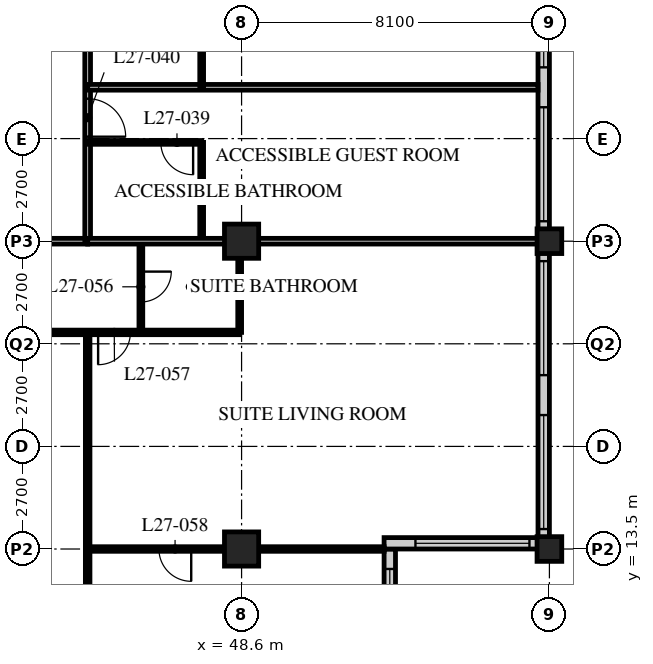
"""IFC4 building model, lengths in metres.
Left out: names, types, materials, properties, quantities, classifications, styles, units other than length and angle.
Written with IfcOpenShell. Run it as: python <this file> out.ifc"""

import sys

from ifc_helpers import new_model, si_unit, direction, frame, frame_2d, origin, origin_2d, place, context, subcontext, project, spatial, rectangle, hollow_rectangle, extrude, element, fill, save


model = new_model("IFC4")
c1 = context("Model", 3, precision=1e-05, world=origin(), true_north=direction((0.0, 1.0)))
c2 = subcontext(c1, "Body", "Model", "MODEL_VIEW")
j1 = project(units=[si_unit("LENGTHUNIT", "METRE"), si_unit("PLANEANGLEUNIT", "RADIAN")], contexts=[c1])
p1 = place(None, origin())
s1 = spatial("IfcSite", under=j1, at=p1, CompositionType="ELEMENT")
p2 = place(p1, origin())
s2 = spatial("IfcBuilding", under=s1, at=p2, CompositionType="ELEMENT")
p3 = place(p2, frame((0.0, 0.0, 110.2)))
s3 = spatial("IfcBuildingStorey", under=s2, at=p3, CompositionType="ELEMENT", Elevation=110.2)
for number, where, z_axis, x_axis in (
    (1, (48.6, 13.5, 0.0), (0.0, 0.0, 1.0), (1.0, 0.0, 0.0)),
    (2, (48.6, 21.6, 0.0), (0.0, 0.0, 1.0), (1.0, 0.0, 0.0)),
):
    element("IfcColumn", number, at=place(p3, frame(where, z_axis=z_axis, x_axis=x_axis)), inside=s3, PredefinedType="COLUMN", context=c2, shape_type="SweptSolid", body=[
        extrude(hollow_rectangle(XDim=0.9, YDim=0.9, WallThickness=0.09, at=origin_2d()), origin(), (0.0, 0.0, 1.0), 3.4),
    ])
for number, where, z_axis, x_axis in (
    (3, (56.7, 13.5, 0.0), (0.0, 0.0, 1.0), (1.0, 0.0, 0.0)),
    (4, (56.7, 21.6, 0.0), (0.0, 0.0, 1.0), (1.0, 0.0, 0.0)),
):
    element("IfcColumn", number, at=place(p3, frame(where, z_axis=z_axis, x_axis=x_axis)), inside=s3, PredefinedType="COLUMN", context=c2, shape_type="SweptSolid", body=[
        extrude(hollow_rectangle(XDim=0.65, YDim=0.65, WallThickness=0.055, at=origin_2d()), origin(), (0.0, 0.0, 1.0), 3.4),
    ])
p4 = place(p3, frame((52.5, 9.75, 0.0), z_axis=(0.0, 0.0, 1.0), x_axis=(0.0, 1.0, 0.0)))
e5 = element("IfcWall", 5, at=p4, inside=s3, PredefinedType="SOLIDWALL", context=c2, shape_type="SweptSolid", body=[
    extrude(rectangle(XDim=3.75, YDim=0.3, at=frame_2d((1.875, 0.0))), origin(), (0.0, 0.0, 1.0), 3.19),
])
p5 = place(p4, frame((0.225, 0.0, 0.9)))
e6 = element("IfcOpeningElement", 6, at=p5, cuts=e5, PredefinedType="OPENING", context=c2, shape_type="SweptSolid", body=[
    extrude(rectangle(XDim=3.0, YDim=1.5, at=frame_2d((1.5, 0.75))), frame((0.0, 0.16, 0.0), z_axis=(0.0, -1.0, 0.0), x_axis=(1.0, 0.0, 0.0)), (0.0, 0.0, 1.0), 0.32),
])
p6 = place(p3, frame((52.35, 13.65, 0.0), z_axis=(0.0, 0.0, 1.0), x_axis=(1.0, 0.0, 0.0)))
e7 = element("IfcWall", 7, at=p6, inside=s3, PredefinedType="SOLIDWALL", context=c2, shape_type="SweptSolid", body=[
    extrude(rectangle(XDim=4.35, YDim=0.3, at=frame_2d((2.175, 0.0))), origin(), (0.0, 0.0, 1.0), 3.19),
])
p7 = place(p6, frame((0.825, 0.0, 0.9)))
e8 = element("IfcOpeningElement", 8, at=p7, cuts=e7, PredefinedType="OPENING", context=c2, shape_type="SweptSolid", body=[
    extrude(rectangle(XDim=3.0, YDim=1.5, at=frame_2d((1.5, 0.75))), frame((0.0, 0.16, 0.0), z_axis=(0.0, -1.0, 0.0), x_axis=(1.0, 0.0, 0.0)), (0.0, 0.0, 1.0), 0.32),
])
p8 = place(p3, frame((56.55, 13.8, 0.0), z_axis=(0.0, 0.0, 1.0), x_axis=(0.0, 1.0, 0.0)))
e9 = element("IfcWall", 9, at=p8, inside=s3, PredefinedType="SOLIDWALL", context=c2, shape_type="SweptSolid", body=[
    extrude(rectangle(XDim=32.1, YDim=0.3, at=frame_2d((16.05, 0.0))), origin(), (0.0, 0.0, 1.0), 3.19),
])
p9 = place(p8, frame((0.225, 0.0, 0.9)))
e10 = element("IfcOpeningElement", 10, at=p9, cuts=e9, PredefinedType="OPENING", context=c2, shape_type="SweptSolid", body=[
    extrude(rectangle(XDim=3.0, YDim=2.0, at=frame_2d((1.5, 1.0))), frame((0.0, 0.16, 0.0), z_axis=(0.0, -1.0, 0.0), x_axis=(1.0, 0.0, 0.0)), (0.0, 0.0, 1.0), 0.32),
])
p10 = place(p8, frame((4.275, 0.0, 0.9)))
e11 = element("IfcOpeningElement", 11, at=p10, cuts=e9, PredefinedType="OPENING", context=c2, shape_type="SweptSolid", body=[
    extrude(rectangle(XDim=3.0, YDim=2.0, at=frame_2d((1.5, 1.0))), frame((0.0, 0.16, 0.0), z_axis=(0.0, -1.0, 0.0), x_axis=(1.0, 0.0, 0.0)), (0.0, 0.0, 1.0), 0.32),
])
p11 = place(p8, frame((8.325, 0.0, 0.9)))
e12 = element("IfcOpeningElement", 12, at=p11, cuts=e9, PredefinedType="OPENING", context=c2, shape_type="SweptSolid", body=[
    extrude(rectangle(XDim=3.0, YDim=2.0, at=frame_2d((1.5, 1.0))), frame((0.0, 0.16, 0.0), z_axis=(0.0, -1.0, 0.0), x_axis=(1.0, 0.0, 0.0)), (0.0, 0.0, 1.0), 0.32),
])
p12 = place(p8, frame((12.375, 0.0, 0.9)))
e13 = element("IfcOpeningElement", 13, at=p12, cuts=e9, PredefinedType="OPENING", context=c2, shape_type="SweptSolid", body=[
    extrude(rectangle(XDim=3.0, YDim=2.0, at=frame_2d((1.5, 1.0))), frame((0.0, 0.16, 0.0), z_axis=(0.0, -1.0, 0.0), x_axis=(1.0, 0.0, 0.0)), (0.0, 0.0, 1.0), 0.32),
])
p13 = place(p8, frame((16.425, 0.0, 0.9)))
e14 = element("IfcOpeningElement", 14, at=p13, cuts=e9, PredefinedType="OPENING", context=c2, shape_type="SweptSolid", body=[
    extrude(rectangle(XDim=3.0, YDim=2.0, at=frame_2d((1.5, 1.0))), frame((0.0, 0.16, 0.0), z_axis=(0.0, -1.0, 0.0), x_axis=(1.0, 0.0, 0.0)), (0.0, 0.0, 1.0), 0.32),
])
p14 = place(p8, frame((20.475, 0.0, 0.9)))
e15 = element("IfcOpeningElement", 15, at=p14, cuts=e9, PredefinedType="OPENING", context=c2, shape_type="SweptSolid", body=[
    extrude(rectangle(XDim=3.0, YDim=2.0, at=frame_2d((1.5, 1.0))), frame((0.0, 0.16, 0.0), z_axis=(0.0, -1.0, 0.0), x_axis=(1.0, 0.0, 0.0)), (0.0, 0.0, 1.0), 0.32),
])
p15 = place(p8, frame((24.525, 0.0, 0.9)))
e16 = element("IfcOpeningElement", 16, at=p15, cuts=e9, PredefinedType="OPENING", context=c2, shape_type="SweptSolid", body=[
    extrude(rectangle(XDim=3.0, YDim=2.0, at=frame_2d((1.5, 1.0))), frame((0.0, 0.16, 0.0), z_axis=(0.0, -1.0, 0.0), x_axis=(1.0, 0.0, 0.0)), (0.0, 0.0, 1.0), 0.32),
])
p16 = place(p8, frame((28.575, 0.0, 0.9)))
e17 = element("IfcOpeningElement", 17, at=p16, cuts=e9, PredefinedType="OPENING", context=c2, shape_type="SweptSolid", body=[
    extrude(rectangle(XDim=3.0, YDim=2.0, at=frame_2d((1.5, 1.0))), frame((0.0, 0.16, 0.0), z_axis=(0.0, -1.0, 0.0), x_axis=(1.0, 0.0, 0.0)), (0.0, 0.0, 1.0), 0.32),
])
p17 = place(p3, frame((12.15, 21.6, 0.0), z_axis=(0.0, 0.0, 1.0), x_axis=(1.0, 0.0, 0.0)))
e18 = element("IfcWall", 18, at=p17, inside=s3, PredefinedType="PARTITIONING", context=c2, shape_type="SweptSolid", body=[
    extrude(rectangle(XDim=32.4, YDim=0.15, at=frame_2d((16.2, 0.0))), origin(), (0.0, 0.0, 1.0), 2.578),
])
p18 = place(p17, frame((5.95, 0.0, 0.0)))
e19 = element("IfcOpeningElement", 19, at=p18, cuts=e18, PredefinedType="OPENING", context=c2, shape_type="SweptSolid", body=[
    extrude(rectangle(XDim=1.0, YDim=2.1, at=frame_2d((0.5, 1.05))), frame((0.0, 0.085, 0.0), z_axis=(0.0, -1.0, 0.0), x_axis=(1.0, 0.0, 0.0)), (0.0, 0.0, 1.0), 0.17),
])
p19 = place(p17, frame((14.05, 0.0, 0.0)))
e20 = element("IfcOpeningElement", 20, at=p19, cuts=e18, PredefinedType="OPENING", context=c2, shape_type="SweptSolid", body=[
    extrude(rectangle(XDim=1.0, YDim=2.1, at=frame_2d((0.5, 1.05))), frame((0.0, 0.085, 0.0), z_axis=(0.0, -1.0, 0.0), x_axis=(1.0, 0.0, 0.0)), (0.0, 0.0, 1.0), 0.17),
])
p20 = place(p17, frame((22.15, 0.0, 0.0)))
e21 = element("IfcOpeningElement", 21, at=p20, cuts=e18, PredefinedType="OPENING", context=c2, shape_type="SweptSolid", body=[
    extrude(rectangle(XDim=1.0, YDim=2.1, at=frame_2d((0.5, 1.05))), frame((0.0, 0.085, 0.0), z_axis=(0.0, -1.0, 0.0), x_axis=(1.0, 0.0, 0.0)), (0.0, 0.0, 1.0), 0.17),
])
p21 = place(p17, frame((1.525, 0.0, 0.0)))
e22 = element("IfcOpeningElement", 22, at=p21, cuts=e18, PredefinedType="OPENING", context=c2, shape_type="SweptSolid", body=[
    extrude(rectangle(XDim=1.0, YDim=2.1, at=frame_2d((0.5, 1.05))), frame((0.0, 0.085, 0.0), z_axis=(0.0, -1.0, 0.0), x_axis=(1.0, 0.0, 0.0)), (0.0, 0.0, 1.0), 0.17),
])
p22 = place(p17, frame((29.875, 0.0, 0.0)))
e23 = element("IfcOpeningElement", 23, at=p22, cuts=e18, PredefinedType="OPENING", context=c2, shape_type="SweptSolid", body=[
    extrude(rectangle(XDim=1.0, YDim=2.1, at=frame_2d((0.5, 1.05))), frame((0.0, 0.085, 0.0), z_axis=(0.0, -1.0, 0.0), x_axis=(1.0, 0.0, 0.0)), (0.0, 0.0, 1.0), 0.17),
])
p23 = place(p3, frame((44.55, 21.6, 0.0), z_axis=(0.0, 0.0, 1.0), x_axis=(0.0, 1.0, 0.0)))
e24 = element("IfcWall", 24, at=p23, inside=s3, PredefinedType="PARTITIONING", context=c2, shape_type="SweptSolid", body=[
    extrude(rectangle(XDim=24.3, YDim=0.15, at=frame_2d((12.15, 0.0))), origin(), (0.0, 0.0, 1.0), 3.19),
])
p24 = place(p23, frame((2.75, 0.0, 0.0)))
e25 = element("IfcOpeningElement", 25, at=p24, cuts=e24, PredefinedType="OPENING", context=c2, shape_type="SweptSolid", body=[
    extrude(rectangle(XDim=1.0, YDim=2.1, at=frame_2d((0.5, 1.05))), frame((0.0, 0.085, 0.0), z_axis=(0.0, -1.0, 0.0), x_axis=(1.0, 0.0, 0.0)), (0.0, 0.0, 1.0), 0.17),
])
p25 = place(p23, frame((6.5, 0.0, 0.0)))
e26 = element("IfcOpeningElement", 26, at=p25, cuts=e24, PredefinedType="OPENING", context=c2, shape_type="SweptSolid", body=[
    extrude(rectangle(XDim=1.0, YDim=2.1, at=frame_2d((0.5, 1.05))), frame((0.0, 0.085, 0.0), z_axis=(0.0, -1.0, 0.0), x_axis=(1.0, 0.0, 0.0)), (0.0, 0.0, 1.0), 0.17),
])
p26 = place(p23, frame((13.55, 0.0, 0.0)))
e27 = element("IfcOpeningElement", 27, at=p26, cuts=e24, PredefinedType="OPENING", context=c2, shape_type="SweptSolid", body=[
    extrude(rectangle(XDim=1.0, YDim=2.1, at=frame_2d((0.5, 1.05))), frame((0.0, 0.085, 0.0), z_axis=(0.0, -1.0, 0.0), x_axis=(1.0, 0.0, 0.0)), (0.0, 0.0, 1.0), 0.17),
])
p27 = place(p23, frame((21.65, 0.0, 0.0)))
e28 = element("IfcOpeningElement", 28, at=p27, cuts=e24, PredefinedType="OPENING", context=c2, shape_type="SweptSolid", body=[
    extrude(rectangle(XDim=1.0, YDim=2.1, at=frame_2d((0.5, 1.05))), frame((0.0, 0.085, 0.0), z_axis=(0.0, -1.0, 0.0), x_axis=(1.0, 0.0, 0.0)), (0.0, 0.0, 1.0), 0.17),
])
p28 = place(p3, frame((47.55, 21.6, 0.0), z_axis=(0.0, 0.0, 1.0), x_axis=(0.0, 1.0, 0.0)))
e29 = element("IfcWall", 29, at=p28, inside=s3, PredefinedType="PARTITIONING", context=c2, shape_type="SweptSolid", body=[
    extrude(rectangle(XDim=2.6, YDim=0.1, at=frame_2d((1.3, 0.0))), origin(), (0.0, 0.0, 1.0), 3.19),
])
p29 = place(p3, frame((44.55, 24.2, 0.0), z_axis=(0.0, 0.0, 1.0), x_axis=(1.0, 0.0, 0.0)))
e30 = element("IfcWall", 30, at=p29, inside=s3, PredefinedType="PARTITIONING", context=c2, shape_type="SweptSolid", body=[
    extrude(rectangle(XDim=3.0, YDim=0.1, at=frame_2d((1.5, 0.0))), origin(), (0.0, 0.0, 1.0), 3.19),
])
p30 = place(p29, frame((1.925, 0.0, 0.0)))
e31 = element("IfcOpeningElement", 31, at=p30, cuts=e30, PredefinedType="OPENING", context=c2, shape_type="SweptSolid", body=[
    extrude(rectangle(XDim=0.85, YDim=2.1, at=frame_2d((0.425, 1.05))), frame((0.0, 0.06, 0.0), z_axis=(0.0, -1.0, 0.0), x_axis=(1.0, 0.0, 0.0)), (0.0, 0.0, 1.0), 0.12),
])
p31 = place(p3, frame((44.55, 25.65, 0.0), z_axis=(0.0, 0.0, 1.0), x_axis=(1.0, 0.0, 0.0)))
e32 = element("IfcWall", 32, at=p31, inside=s3, PredefinedType="PARTITIONING", context=c2, shape_type="SweptSolid", body=[
    extrude(rectangle(XDim=11.85, YDim=0.15, at=frame_2d((5.925, 0.0))), origin(), (0.0, 0.0, 1.0), 3.19),
])
p32 = place(p3, frame((47.55, 25.65, 0.0), z_axis=(0.0, 0.0, 1.0), x_axis=(0.0, 1.0, 0.0)))
e33 = element("IfcWall", 33, at=p32, inside=s3, PredefinedType="PARTITIONING", context=c2, shape_type="SweptSolid", body=[
    extrude(rectangle(XDim=2.3, YDim=0.1, at=frame_2d((1.15, 0.0))), origin(), (0.0, 0.0, 1.0), 3.19),
])
p33 = place(p3, frame((40.5, 19.2, 0.0), z_axis=(0.0, 0.0, 1.0), x_axis=(1.0, 0.0, 0.0)))
e34 = element("IfcWall", 34, at=p33, inside=s3, PredefinedType="PARTITIONING", context=c2, shape_type="SweptSolid", body=[
    extrude(rectangle(XDim=8.05, YDim=0.12, at=frame_2d((4.025, 0.0))), origin(), (0.0, 0.0, 1.0), 3.19),
])
p34 = place(p33, frame((0.475, 0.0, 0.0)))
e35 = element("IfcOpeningElement", 35, at=p34, cuts=e34, PredefinedType="OPENING", context=c2, shape_type="SweptSolid", body=[
    extrude(rectangle(XDim=0.85, YDim=2.1, at=frame_2d((0.425, 1.05))), frame((0.0, 0.07, 0.0), z_axis=(0.0, -1.0, 0.0), x_axis=(1.0, 0.0, 0.0)), (0.0, 0.0, 1.0), 0.14),
])
p35 = place(p33, frame((4.325, 0.0, 0.0)))
e36 = element("IfcOpeningElement", 36, at=p35, cuts=e34, PredefinedType="OPENING", context=c2, shape_type="SweptSolid", body=[
    extrude(rectangle(XDim=0.85, YDim=2.1, at=frame_2d((0.425, 1.05))), frame((0.0, 0.07, 0.0), z_axis=(0.0, -1.0, 0.0), x_axis=(1.0, 0.0, 0.0)), (0.0, 0.0, 1.0), 0.14),
])
p36 = place(p3, frame((45.95, 21.6, 0.0), z_axis=(0.0, 0.0, 1.0), x_axis=(0.0, -1.0, 0.0)))
e37 = element("IfcWall", 37, at=p36, inside=s3, PredefinedType="PARTITIONING", context=c2, shape_type="SweptSolid", body=[
    extrude(rectangle(XDim=2.4, YDim=0.1, at=frame_2d((1.2, 0.0))), origin(), (0.0, 0.0, 1.0), 3.19),
])
p37 = place(p36, frame((0.8, 0.0, 0.0)))
e38 = element("IfcOpeningElement", 38, at=p37, cuts=e37, PredefinedType="OPENING", context=c2, shape_type="SweptSolid", body=[
    extrude(rectangle(XDim=0.8, YDim=2.1, at=frame_2d((0.4, 1.05))), frame((0.0, 0.06, 0.0), z_axis=(0.0, -1.0, 0.0), x_axis=(1.0, 0.0, 0.0)), (0.0, 0.0, 1.0), 0.12),
])
p38 = place(p3, frame((48.55, 21.6, 0.0), z_axis=(0.0, 0.0, 1.0), x_axis=(0.0, -1.0, 0.0)))
e39 = element("IfcWall", 39, at=p38, inside=s3, PredefinedType="PARTITIONING", context=c2, shape_type="SweptSolid", body=[
    extrude(rectangle(XDim=2.4, YDim=0.1, at=frame_2d((1.2, 0.0))), origin(), (0.0, 0.0, 1.0), 2.578),
])
p39 = place(p3, frame((44.55, 19.2, 0.0), z_axis=(0.0, 0.0, 1.0), x_axis=(0.0, -1.0, 0.0)))
e40 = element("IfcWall", 40, at=p39, inside=s3, PredefinedType="PARTITIONING", context=c2, shape_type="SweptSolid", body=[
    extrude(rectangle(XDim=13.5, YDim=0.12, at=frame_2d((6.75, 0.0))), origin(), (0.0, 0.0, 1.0), 3.19),
])
p40 = place(p3, frame((44.55, 13.5, 0.0), z_axis=(0.0, 0.0, 1.0), x_axis=(1.0, 0.0, 0.0)))
e41 = element("IfcWall", 41, at=p40, inside=s3, PredefinedType="PARTITIONING", context=c2, shape_type="SweptSolid", body=[
    extrude(rectangle(XDim=7.8, YDim=0.12, at=frame_2d((3.9, 0.0))), origin(), (0.0, 0.0, 1.0), 2.578),
])
p41 = place(p40, frame((1.875, 0.0, 0.0)))
e42 = element("IfcOpeningElement", 42, at=p41, cuts=e41, PredefinedType="OPENING", context=c2, shape_type="SweptSolid", body=[
    extrude(rectangle(XDim=0.85, YDim=2.1, at=frame_2d((0.425, 1.05))), frame((0.0, 0.07, 0.0), z_axis=(0.0, -1.0, 0.0), x_axis=(1.0, 0.0, 0.0)), (0.0, 0.0, 1.0), 0.14),
])
p42 = place(p3, frame((44.55, 21.6, 0.0), z_axis=(0.0, 0.0, 1.0), x_axis=(1.0, 0.0, 0.0)))
e43 = element("IfcWall", 43, at=p42, inside=s3, PredefinedType="PARTITIONING", context=c2, shape_type="SweptSolid", body=[
    extrude(rectangle(XDim=11.85, YDim=0.15, at=frame_2d((5.925, 0.0))), origin(), (0.0, 0.0, 1.0), 2.578),
])
p43 = place(p5, origin())
e44 = element("IfcWindow", 44, at=p43, inside=s3, PartitioningType="SINGLE_PANEL", PredefinedType="WINDOW", context=c2, shape_type="SweptSolid", body=[
    extrude(rectangle(XDim=3.0, YDim=1.5, at=frame_2d((1.5, 0.75))), frame((0.0, 0.03, 0.0), z_axis=(0.0, -1.0, 0.0), x_axis=(1.0, 0.0, 0.0)), (0.0, 0.0, 1.0), 0.06),
])
fill(e6, e44)
p44 = place(p7, origin())
e45 = element("IfcWindow", 45, at=p44, inside=s3, PartitioningType="SINGLE_PANEL", PredefinedType="WINDOW", context=c2, shape_type="SweptSolid", body=[
    extrude(rectangle(XDim=3.0, YDim=1.5, at=frame_2d((1.5, 0.75))), frame((0.0, 0.03, 0.0), z_axis=(0.0, -1.0, 0.0), x_axis=(1.0, 0.0, 0.0)), (0.0, 0.0, 1.0), 0.06),
])
fill(e8, e45)
p45 = place(p9, origin())
e46 = element("IfcWindow", 46, at=p45, inside=s3, PartitioningType="SINGLE_PANEL", PredefinedType="WINDOW", context=c2, shape_type="SweptSolid", body=[
    extrude(rectangle(XDim=3.0, YDim=2.0, at=frame_2d((1.5, 1.0))), frame((0.0, 0.03, 0.0), z_axis=(0.0, -1.0, 0.0), x_axis=(1.0, 0.0, 0.0)), (0.0, 0.0, 1.0), 0.06),
])
fill(e10, e46)
p46 = place(p10, origin())
e47 = element("IfcWindow", 47, at=p46, inside=s3, PartitioningType="SINGLE_PANEL", PredefinedType="WINDOW", context=c2, shape_type="SweptSolid", body=[
    extrude(rectangle(XDim=3.0, YDim=2.0, at=frame_2d((1.5, 1.0))), frame((0.0, 0.03, 0.0), z_axis=(0.0, -1.0, 0.0), x_axis=(1.0, 0.0, 0.0)), (0.0, 0.0, 1.0), 0.06),
])
fill(e11, e47)
p47 = place(p11, origin())
e48 = element("IfcWindow", 48, at=p47, inside=s3, PartitioningType="SINGLE_PANEL", PredefinedType="WINDOW", context=c2, shape_type="SweptSolid", body=[
    extrude(rectangle(XDim=3.0, YDim=2.0, at=frame_2d((1.5, 1.0))), frame((0.0, 0.03, 0.0), z_axis=(0.0, -1.0, 0.0), x_axis=(1.0, 0.0, 0.0)), (0.0, 0.0, 1.0), 0.06),
])
fill(e12, e48)
p48 = place(p12, origin())
e49 = element("IfcWindow", 49, at=p48, inside=s3, PartitioningType="SINGLE_PANEL", PredefinedType="WINDOW", context=c2, shape_type="SweptSolid", body=[
    extrude(rectangle(XDim=3.0, YDim=2.0, at=frame_2d((1.5, 1.0))), frame((0.0, 0.03, 0.0), z_axis=(0.0, -1.0, 0.0), x_axis=(1.0, 0.0, 0.0)), (0.0, 0.0, 1.0), 0.06),
])
fill(e13, e49)
p49 = place(p30, origin())
e50 = element("IfcDoor", 50, at=p49, inside=s3, OperationType="SINGLE_SWING_LEFT", PredefinedType="DOOR", context=c2, shape_type="SweptSolid", body=[
    extrude(rectangle(XDim=0.85, YDim=2.1, at=frame_2d((0.425, 1.05))), frame((0.0, 0.025, 0.0), z_axis=(0.0, -1.0, 0.0), x_axis=(1.0, 0.0, 0.0)), (0.0, 0.0, 1.0), 0.05),
])
fill(e31, e50)
p50 = place(p24, origin())
e51 = element("IfcDoor", 51, at=p50, inside=s3, OperationType="SINGLE_SWING_RIGHT", PredefinedType="DOOR", context=c2, shape_type="SweptSolid", body=[
    extrude(rectangle(XDim=1.0, YDim=2.1, at=frame_2d((0.5, 1.05))), frame((0.0, 0.025, 0.0), z_axis=(0.0, -1.0, 0.0), x_axis=(1.0, 0.0, 0.0)), (0.0, 0.0, 1.0), 0.05),
])
fill(e25, e51)
p51 = place(p37, origin())
e52 = element("IfcDoor", 52, at=p51, inside=s3, OperationType="SINGLE_SWING_LEFT", PredefinedType="DOOR", context=c2, shape_type="SweptSolid", body=[
    extrude(rectangle(XDim=0.8, YDim=2.1, at=frame_2d((0.4, 1.05))), frame((0.0, 0.025, 0.0), z_axis=(0.0, -1.0, 0.0), x_axis=(1.0, 0.0, 0.0)), (0.0, 0.0, 1.0), 0.05),
])
fill(e38, e52)
p52 = place(p35, origin())
e53 = element("IfcDoor", 53, at=p52, inside=s3, OperationType="SINGLE_SWING_RIGHT", PredefinedType="DOOR", context=c2, shape_type="SweptSolid", body=[
    extrude(rectangle(XDim=0.85, YDim=2.1, at=frame_2d((0.425, 1.05))), frame((0.0, 0.025, 0.0), z_axis=(0.0, -1.0, 0.0), x_axis=(1.0, 0.0, 0.0)), (0.0, 0.0, 1.0), 0.05),
])
fill(e36, e53)
p53 = place(p41, origin())
e54 = element("IfcDoor", 54, at=p53, inside=s3, OperationType="SINGLE_SWING_LEFT", PredefinedType="DOOR", context=c2, shape_type="SweptSolid", body=[
    extrude(rectangle(XDim=0.85, YDim=2.1, at=frame_2d((0.425, 1.05))), frame((0.0, 0.025, 0.0), z_axis=(0.0, -1.0, 0.0), x_axis=(1.0, 0.0, 0.0)), (0.0, 0.0, 1.0), 0.05),
])
fill(e42, e54)
save(model, sys.argv[1])
